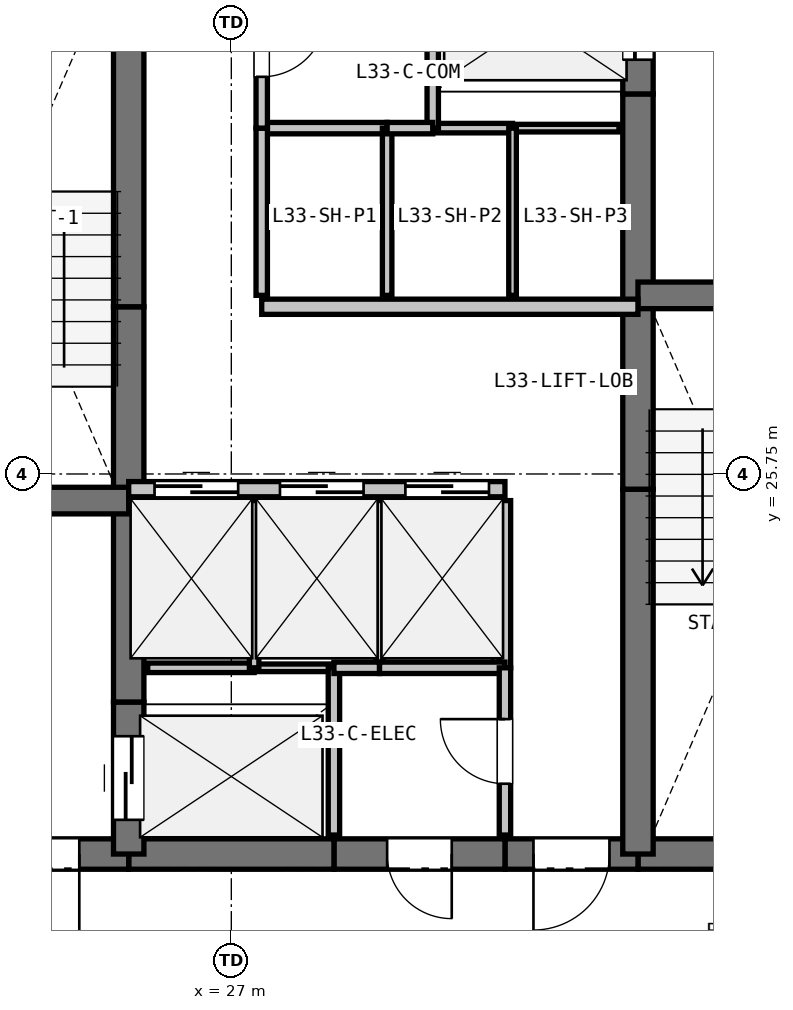
"""IFC4 building model, lengths in metres.
Left out: names, types, materials, properties, quantities, classifications, styles, units other than length and angle.
Written with IfcOpenShell. Run it as: python <this file> out.ifc"""

import sys

from ifc_helpers import new_model, si_unit, direction, frame, frame_2d, origin, place, context, subcontext, project, spatial, rectangle, extrude, element, fill, save


model = new_model("IFC4")
c1 = context("Model", 3, precision=1e-05, world=origin(), true_north=direction((0.0, 1.0)))
c2 = subcontext(c1, "Body", "Model", "MODEL_VIEW")
j1 = project(units=[si_unit("LENGTHUNIT", "METRE"), si_unit("PLANEANGLEUNIT", "RADIAN")], contexts=[c1])
p1 = place(None, origin())
s1 = spatial("IfcSite", under=j1, at=p1, CompositionType="ELEMENT")
p2 = place(p1, origin())
s2 = spatial("IfcBuilding", under=s1, at=p2, CompositionType="ELEMENT")
p3 = place(p2, frame((0.0, 0.0, 121.2)))
s3 = spatial("IfcBuildingStorey", under=s2, at=p3, CompositionType="ELEMENT", Elevation=121.2)
p4 = place(p3, frame((35.8, 20.75, 0.0), z_axis=(0.0, 0.0, 1.0), x_axis=(-1.0, 0.0, 0.0)))
e1 = element("IfcWall", 1, at=p4, inside=s3, PredefinedType="SHEAR", context=c2, shape_type="SweptSolid", body=[
    extrude(rectangle(XDim=3.45, YDim=0.4, at=frame_2d((1.725, 0.0))), origin(), (0.0, 0.0, 1.0), 3.06),
])
p5 = place(p3, frame((32.35, 20.75, 0.0), z_axis=(0.0, 0.0, 1.0), x_axis=(-1.0, 0.0, 0.0)))
e2 = element("IfcWall", 2, at=p5, inside=s3, PredefinedType="SHEAR", context=c2, shape_type="SweptSolid", body=[
    extrude(rectangle(XDim=1.75, YDim=0.4, at=frame_2d((0.875, 0.0))), origin(), (0.0, 0.0, 1.0), 3.06),
])
p6 = place(p5, frame((0.375, 0.0, 0.0)))
e3 = element("IfcOpeningElement", 3, at=p6, cuts=e2, PredefinedType="OPENING", context=c2, shape_type="SweptSolid", body=[
    extrude(rectangle(XDim=1.0, YDim=2.15, at=frame_2d((0.5, 1.075))), frame((0.0, 0.21, 0.0), z_axis=(0.0, -1.0, 0.0), x_axis=(1.0, 0.0, 0.0)), (0.0, 0.0, 1.0), 0.42),
])
p7 = place(p3, frame((30.6, 20.75, 0.0), z_axis=(0.0, 0.0, 1.0), x_axis=(-1.0, 0.0, 0.0)))
e4 = element("IfcWall", 4, at=p7, inside=s3, PredefinedType="SHEAR", context=c2, shape_type="SweptSolid", body=[
    extrude(rectangle(XDim=2.25, YDim=0.4, at=frame_2d((1.125, 0.0))), origin(), (0.0, 0.0, 1.0), 3.06),
])
p8 = place(p7, frame((0.7, 0.0, 0.0)))
e5 = element("IfcOpeningElement", 5, at=p8, cuts=e4, PredefinedType="OPENING", context=c2, shape_type="SweptSolid", body=[
    extrude(rectangle(XDim=0.85, YDim=2.1, at=frame_2d((0.425, 1.05))), frame((0.0, 0.21, 0.0), z_axis=(0.0, -1.0, 0.0), x_axis=(1.0, 0.0, 0.0)), (0.0, 0.0, 1.0), 0.42),
])
p9 = place(p3, frame((28.35, 20.75, 0.0), z_axis=(0.0, 0.0, 1.0), x_axis=(-1.0, 0.0, 0.0)))
e6 = element("IfcWall", 6, at=p9, inside=s3, PredefinedType="SHEAR", context=c2, shape_type="SweptSolid", body=[
    extrude(rectangle(XDim=2.7, YDim=0.4, at=frame_2d((1.35, 0.0))), origin(), (0.0, 0.0, 1.0), 3.06),
])
p10 = place(p3, frame((25.65, 20.75, 0.0), z_axis=(0.0, 0.0, 1.0), x_axis=(-1.0, 0.0, 0.0)))
e7 = element("IfcWall", 7, at=p10, inside=s3, PredefinedType="SHEAR", context=c2, shape_type="SweptSolid", body=[
    extrude(rectangle(XDim=3.45, YDim=0.4, at=frame_2d((1.725, 0.0))), origin(), (0.0, 0.0, 1.0), 3.06),
])
p11 = place(p10, frame((0.65, 0.0, 0.0)))
e8 = element("IfcOpeningElement", 8, at=p11, cuts=e7, PredefinedType="OPENING", context=c2, shape_type="SweptSolid", body=[
    extrude(rectangle(XDim=1.15, YDim=2.15, at=frame_2d((0.575, 1.075))), frame((0.0, 0.21, 0.0), z_axis=(0.0, -1.0, 0.0), x_axis=(1.0, 0.0, 0.0)), (0.0, 0.0, 1.0), 0.42),
])
p12 = place(p3, frame((25.65, 20.75, 0.0), z_axis=(0.0, 0.0, 1.0), x_axis=(0.0, 1.0, 0.0)))
e9 = element("IfcWall", 9, at=p12, inside=s3, PredefinedType="SHEAR", context=c2, shape_type="SweptSolid", body=[
    extrude(rectangle(XDim=2.0, YDim=0.4, at=frame_2d((1.0, 0.0))), origin(), (0.0, 0.0, 1.0), 3.06),
])
p13 = place(p12, frame((0.45, 0.0, 0.0)))
e10 = element("IfcOpeningElement", 10, at=p13, cuts=e9, PredefinedType="OPENING", context=c2, shape_type="SweptSolid", body=[
    extrude(rectangle(XDim=1.1, YDim=2.15, at=frame_2d((0.55, 1.075))), frame((0.0, 0.21, 0.0), z_axis=(0.0, -1.0, 0.0), x_axis=(1.0, 0.0, 0.0)), (0.0, 0.0, 1.0), 0.42),
])
p14 = place(p3, frame((25.65, 22.75, 0.0), z_axis=(0.0, 0.0, 1.0), x_axis=(0.0, 1.0, 0.0)))
e11 = element("IfcWall", 11, at=p14, inside=s3, PredefinedType="SHEAR", context=c2, shape_type="SweptSolid", body=[
    extrude(rectangle(XDim=2.8, YDim=0.4, at=frame_2d((1.4, 0.0))), origin(), (0.0, 0.0, 1.0), 3.06),
])
p15 = place(p3, frame((25.65, 25.55, 0.0), z_axis=(0.0, 0.0, 1.0), x_axis=(0.0, 1.0, 0.0)))
e12 = element("IfcWall", 12, at=p15, inside=s3, PredefinedType="SHEAR", context=c2, shape_type="SweptSolid", body=[
    extrude(rectangle(XDim=2.4, YDim=0.4, at=frame_2d((1.2, 0.0))), origin(), (0.0, 0.0, 1.0), 3.06),
])
for number, where, z_axis, x_axis in (
    (13, (25.65, 27.95, 0.0), (0.0, 0.0, 1.0), (0.0, 1.0, 0.0)),
    (14, (32.35, 20.75, 0.0), (0.0, 0.0, 1.0), (0.0, 1.0, 0.0)),
):
    element("IfcWall", number, at=place(p3, frame(where, z_axis=z_axis, x_axis=x_axis)), inside=s3, PredefinedType="SHEAR", context=c2, shape_type="SweptSolid", body=[
        extrude(rectangle(XDim=4.8, YDim=0.4, at=frame_2d((2.4, 0.0))), origin(), (0.0, 0.0, 1.0), 3.06),
    ])
p16 = place(p3, frame((32.35, 25.55, 0.0), z_axis=(0.0, 0.0, 1.0), x_axis=(0.0, 1.0, 0.0)))
e15 = element("IfcWall", 15, at=p16, inside=s3, PredefinedType="SHEAR", context=c2, shape_type="SweptSolid", body=[
    extrude(rectangle(XDim=2.4, YDim=0.4, at=frame_2d((1.2, 0.0))), origin(), (0.0, 0.0, 1.0), 3.06),
])
p17 = place(p3, frame((32.35, 27.95, 0.0), z_axis=(0.0, 0.0, 1.0), x_axis=(0.0, 1.0, 0.0)))
e16 = element("IfcWall", 16, at=p17, inside=s3, PredefinedType="SHEAR", context=c2, shape_type="SweptSolid", body=[
    extrude(rectangle(XDim=2.8, YDim=0.4, at=frame_2d((1.4, 0.0))), origin(), (0.0, 0.0, 1.0), 3.06),
])
p18 = place(p3, frame((32.35, 30.75, 0.0), z_axis=(0.0, 0.0, 1.0), x_axis=(0.0, 1.0, 0.0)))
e17 = element("IfcWall", 17, at=p18, inside=s3, PredefinedType="SHEAR", context=c2, shape_type="SweptSolid", body=[
    extrude(rectangle(XDim=2.0, YDim=0.4, at=frame_2d((1.0, 0.0))), origin(), (0.0, 0.0, 1.0), 3.06),
])
p19 = place(p18, frame((0.45, 0.0, 0.0)))
e18 = element("IfcOpeningElement", 18, at=p19, cuts=e17, PredefinedType="OPENING", context=c2, shape_type="SweptSolid", body=[
    extrude(rectangle(XDim=1.1, YDim=2.15, at=frame_2d((0.55, 1.075))), frame((0.0, 0.21, 0.0), z_axis=(0.0, -1.0, 0.0), x_axis=(1.0, 0.0, 0.0)), (0.0, 0.0, 1.0), 0.42),
])
p20 = place(p3, frame((22.2, 25.4, 0.0), z_axis=(0.0, 0.0, 1.0), x_axis=(1.0, 0.0, 0.0)))
e19 = element("IfcWall", 19, at=p20, inside=s3, PredefinedType="SHEAR", context=c2, shape_type="SweptSolid", body=[
    extrude(rectangle(XDim=3.45, YDim=0.35, at=frame_2d((1.725, 0.0))), origin(), (0.0, 0.0, 1.0), 3.06),
])
p21 = place(p20, frame((1.15, 0.0, 0.0)))
e20 = element("IfcOpeningElement", 20, at=p21, cuts=e19, PredefinedType="OPENING", context=c2, shape_type="SweptSolid", body=[
    extrude(rectangle(XDim=1.15, YDim=2.15, at=frame_2d((0.575, 1.075))), frame((0.0, 0.185, 0.0), z_axis=(0.0, -1.0, 0.0), x_axis=(1.0, 0.0, 0.0)), (0.0, 0.0, 1.0), 0.37),
])
p22 = place(p3, frame((32.35, 28.1, 0.0), z_axis=(0.0, 0.0, 1.0), x_axis=(1.0, 0.0, 0.0)))
e21 = element("IfcWall", 21, at=p22, inside=s3, PredefinedType="SHEAR", context=c2, shape_type="SweptSolid", body=[
    extrude(rectangle(XDim=3.45, YDim=0.35, at=frame_2d((1.725, 0.0))), origin(), (0.0, 0.0, 1.0), 3.06),
])
p23 = place(p22, frame((1.15, 0.0, 0.0)))
e22 = element("IfcOpeningElement", 22, at=p23, cuts=e21, PredefinedType="OPENING", context=c2, shape_type="SweptSolid", body=[
    extrude(rectangle(XDim=1.15, YDim=2.15, at=frame_2d((0.575, 1.075))), frame((0.0, 0.185, 0.0), z_axis=(0.0, -1.0, 0.0), x_axis=(1.0, 0.0, 0.0)), (0.0, 0.0, 1.0), 0.37),
])
p24 = place(p3, frame((25.65, 25.55, 0.0), z_axis=(0.0, 0.0, 1.0), x_axis=(1.0, 0.0, 0.0)))
e23 = element("IfcWall", 23, at=p24, inside=s3, PredefinedType="PARTITIONING", context=c2, shape_type="SweptSolid", body=[
    extrude(rectangle(XDim=4.95, YDim=0.2, at=frame_2d((2.475, 0.0))), origin(), (0.0, 0.0, 1.0), 3.06),
])
p25 = place(p24, frame((0.34, 0.0, 0.0)))
e24 = element("IfcOpeningElement", 24, at=p25, cuts=e23, PredefinedType="OPENING", context=c2, shape_type="SweptSolid", body=[
    extrude(rectangle(XDim=1.1, YDim=2.15, at=frame_2d((0.55, 1.075))), frame((0.0, 0.11, 0.0), z_axis=(0.0, -1.0, 0.0), x_axis=(1.0, 0.0, 0.0)), (0.0, 0.0, 1.0), 0.22),
])
p26 = place(p24, frame((1.99, 0.0, 0.0)))
e25 = element("IfcOpeningElement", 25, at=p26, cuts=e23, PredefinedType="OPENING", context=c2, shape_type="SweptSolid", body=[
    extrude(rectangle(XDim=1.1, YDim=2.15, at=frame_2d((0.55, 1.075))), frame((0.0, 0.11, 0.0), z_axis=(0.0, -1.0, 0.0), x_axis=(1.0, 0.0, 0.0)), (0.0, 0.0, 1.0), 0.22),
])
p27 = place(p24, frame((3.64, 0.0, 0.0)))
e26 = element("IfcOpeningElement", 26, at=p27, cuts=e23, PredefinedType="OPENING", context=c2, shape_type="SweptSolid", body=[
    extrude(rectangle(XDim=1.1, YDim=2.15, at=frame_2d((0.55, 1.075))), frame((0.0, 0.11, 0.0), z_axis=(0.0, -1.0, 0.0), x_axis=(1.0, 0.0, 0.0)), (0.0, 0.0, 1.0), 0.22),
])
p28 = place(p3, frame((27.4, 27.95, 0.0), z_axis=(0.0, 0.0, 1.0), x_axis=(1.0, 0.0, 0.0)))
e27 = element("IfcWall", 27, at=p28, inside=s3, PredefinedType="PARTITIONING", context=c2, shape_type="SweptSolid", body=[
    extrude(rectangle(XDim=4.95, YDim=0.2, at=frame_2d((2.475, 0.0))), origin(), (0.0, 0.0, 1.0), 3.06),
])
p29 = place(p3, frame((25.9, 23.2, 0.0), z_axis=(0.0, 0.0, 1.0), x_axis=(1.0, 0.0, 0.0)))
e28 = element("IfcWall", 28, at=p29, inside=s3, PredefinedType="PARTITIONING", context=c2, shape_type="SweptSolid", body=[
    extrude(rectangle(XDim=1.4, YDim=0.125, at=frame_2d((0.7, 0.0))), origin(), (0.0, 0.0, 1.0), 3.06),
])
p30 = place(p3, frame((27.3, 23.2, 0.0), z_axis=(0.0, 0.0, 1.0), x_axis=(1.0, 0.0, 0.0)))
e29 = element("IfcWall", 29, at=p30, inside=s3, PredefinedType="PARTITIONING", context=c2, shape_type="SweptSolid", body=[
    extrude(rectangle(XDim=1.05, YDim=0.1, at=frame_2d((0.525, 0.0))), origin(), (0.0, 0.0, 1.0), 3.06),
])
p31 = place(p3, frame((28.35, 23.2, 0.0), z_axis=(0.0, 0.0, 1.0), x_axis=(0.0, -1.0, 0.0)))
e30 = element("IfcWall", 30, at=p31, inside=s3, PredefinedType="PARTITIONING", context=c2, shape_type="SweptSolid", body=[
    extrude(rectangle(XDim=2.2, YDim=0.15, at=frame_2d((1.1, 0.0))), origin(), (0.0, 0.0, 1.0), 3.06),
])
p32 = place(p3, frame((32.1, 30.3, 0.0), z_axis=(0.0, 0.0, 1.0), x_axis=(-1.0, 0.0, 0.0)))
e31 = element("IfcWall", 31, at=p32, inside=s3, PredefinedType="PARTITIONING", context=c2, shape_type="SweptSolid", body=[
    extrude(rectangle(XDim=1.4, YDim=0.1, at=frame_2d((0.7, 0.0))), origin(), (0.0, 0.0, 1.0), 3.06),
])
p33 = place(p3, frame((30.7, 30.3, 0.0), z_axis=(0.0, 0.0, 1.0), x_axis=(-1.0, 0.0, 0.0)))
e32 = element("IfcWall", 32, at=p33, inside=s3, PredefinedType="PARTITIONING", context=c2, shape_type="SweptSolid", body=[
    extrude(rectangle(XDim=1.05, YDim=0.125, at=frame_2d((0.525, 0.0))), origin(), (0.0, 0.0, 1.0), 3.06),
])
p34 = place(p3, frame((29.65, 30.3, 0.0), z_axis=(0.0, 0.0, 1.0), x_axis=(0.0, 1.0, 0.0)))
e33 = element("IfcWall", 33, at=p34, inside=s3, PredefinedType="PARTITIONING", context=c2, shape_type="SweptSolid", body=[
    extrude(rectangle(XDim=2.2, YDim=0.15, at=frame_2d((1.1, 0.0))), origin(), (0.0, 0.0, 1.0), 3.06),
])
p35 = place(p3, frame((27.3, 25.4, 0.0), z_axis=(0.0, 0.0, 1.0), x_axis=(0.0, -1.0, 0.0)))
e34 = element("IfcWall", 34, at=p35, inside=s3, PredefinedType="PARTITIONING", context=c2, shape_type="SweptSolid", body=[
    extrude(rectangle(XDim=2.2, YDim=0.125, at=frame_2d((1.1, 0.0))), origin(), (0.0, 0.0, 1.0), 3.06),
])
p36 = place(p3, frame((28.95, 25.4, 0.0), z_axis=(0.0, 0.0, 1.0), x_axis=(0.0, -1.0, 0.0)))
e35 = element("IfcWall", 35, at=p36, inside=s3, PredefinedType="PARTITIONING", context=c2, shape_type="SweptSolid", body=[
    extrude(rectangle(XDim=2.2, YDim=0.1, at=frame_2d((1.1, 0.0))), origin(), (0.0, 0.0, 1.0), 3.06),
])
p37 = place(p3, frame((28.95, 23.2, 0.0), z_axis=(0.0, 0.0, 1.0), x_axis=(-1.0, 0.0, 0.0)))
e36 = element("IfcWall", 36, at=p37, inside=s3, PredefinedType="PARTITIONING", context=c2, shape_type="SweptSolid", body=[
    extrude(rectangle(XDim=0.6, YDim=0.15, at=frame_2d((0.3, 0.0))), origin(), (0.0, 0.0, 1.0), 3.06),
])
p38 = place(p3, frame((30.6, 25.4, 0.0), z_axis=(0.0, 0.0, 1.0), x_axis=(0.0, -1.0, 0.0)))
e37 = element("IfcWall", 37, at=p38, inside=s3, PredefinedType="PARTITIONING", context=c2, shape_type="SweptSolid", body=[
    extrude(rectangle(XDim=2.2, YDim=0.15, at=frame_2d((1.1, 0.0))), origin(), (0.0, 0.0, 1.0), 3.06),
])
for number, where, z_axis, x_axis in (
    (38, (30.6, 23.2, 0.0), (0.0, 0.0, 1.0), (-1.0, 0.0, 0.0)),
    (39, (27.4, 30.3, 0.0), (0.0, 0.0, 1.0), (1.0, 0.0, 0.0)),
):
    element("IfcWall", number, at=place(p3, frame(where, z_axis=z_axis, x_axis=x_axis)), inside=s3, PredefinedType="PARTITIONING", context=c2, shape_type="SweptSolid", body=[
        extrude(rectangle(XDim=1.65, YDim=0.15, at=frame_2d((0.825, 0.0))), origin(), (0.0, 0.0, 1.0), 3.06),
    ])
p39 = place(p3, frame((29.05, 30.3, 0.0), z_axis=(0.0, 0.0, 1.0), x_axis=(0.0, -1.0, 0.0)))
e40 = element("IfcWall", 40, at=p39, inside=s3, PredefinedType="PARTITIONING", context=c2, shape_type="SweptSolid", body=[
    extrude(rectangle(XDim=2.2, YDim=0.125, at=frame_2d((1.1, 0.0))), origin(), (0.0, 0.0, 1.0), 3.06),
])
p40 = place(p3, frame((27.4, 28.1, 0.0), z_axis=(0.0, 0.0, 1.0), x_axis=(0.0, 1.0, 0.0)))
e41 = element("IfcWall", 41, at=p40, inside=s3, PredefinedType="PARTITIONING", context=c2, shape_type="SweptSolid", body=[
    extrude(rectangle(XDim=2.2, YDim=0.15, at=frame_2d((1.1, 0.0))), origin(), (0.0, 0.0, 1.0), 3.06),
])
p41 = place(p3, frame((29.05, 30.3, 0.0), z_axis=(0.0, 0.0, 1.0), x_axis=(1.0, 0.0, 0.0)))
e42 = element("IfcWall", 42, at=p41, inside=s3, PredefinedType="PARTITIONING", context=c2, shape_type="SweptSolid", body=[
    extrude(rectangle(XDim=0.6, YDim=0.15, at=frame_2d((0.3, 0.0))), origin(), (0.0, 0.0, 1.0), 3.06),
])
p42 = place(p3, frame((30.7, 30.3, 0.0), z_axis=(0.0, 0.0, 1.0), x_axis=(0.0, -1.0, 0.0)))
e43 = element("IfcWall", 43, at=p42, inside=s3, PredefinedType="PARTITIONING", context=c2, shape_type="SweptSolid", body=[
    extrude(rectangle(XDim=2.2, YDim=0.1, at=frame_2d((1.1, 0.0))), origin(), (0.0, 0.0, 1.0), 3.06),
])
p43 = place(p3, frame((30.6, 21.0, 0.0), z_axis=(0.0, 0.0, 1.0), x_axis=(0.0, 1.0, 0.0)))
e44 = element("IfcWall", 44, at=p43, inside=s3, PredefinedType="PARTITIONING", context=c2, shape_type="SweptSolid", body=[
    extrude(rectangle(XDim=2.2, YDim=0.15, at=frame_2d((1.1, 0.0))), origin(), (0.0, 0.0, 1.0), 3.06),
])
p44 = place(p43, frame((0.675, 0.0, 0.0)))
e45 = element("IfcOpeningElement", 45, at=p44, cuts=e44, PredefinedType="OPENING", context=c2, shape_type="SweptSolid", body=[
    extrude(rectangle(XDim=0.85, YDim=2.1, at=frame_2d((0.425, 1.05))), frame((0.0, 0.085, 0.0), z_axis=(0.0, -1.0, 0.0), x_axis=(1.0, 0.0, 0.0)), (0.0, 0.0, 1.0), 0.17),
])
p45 = place(p3, frame((27.4, 32.5, 0.0), z_axis=(0.0, 0.0, 1.0), x_axis=(0.0, -1.0, 0.0)))
e46 = element("IfcWall", 46, at=p45, inside=s3, PredefinedType="PARTITIONING", context=c2, shape_type="SweptSolid", body=[
    extrude(rectangle(XDim=2.2, YDim=0.15, at=frame_2d((1.1, 0.0))), origin(), (0.0, 0.0, 1.0), 3.06),
])
p46 = place(p45, frame((0.675, 0.0, 0.0)))
e47 = element("IfcOpeningElement", 47, at=p46, cuts=e46, PredefinedType="OPENING", context=c2, shape_type="SweptSolid", body=[
    extrude(rectangle(XDim=0.85, YDim=2.1, at=frame_2d((0.425, 1.05))), frame((0.0, 0.085, 0.0), z_axis=(0.0, -1.0, 0.0), x_axis=(1.0, 0.0, 0.0)), (0.0, 0.0, 1.0), 0.17),
])
p47 = place(p25, origin())
e48 = element("IfcDoor", 48, at=p47, inside=s3, OperationType="SLIDING_TO_LEFT", PredefinedType="DOOR", context=c2, shape_type="SweptSolid", body=[
    extrude(rectangle(XDim=1.1, YDim=2.15, at=frame_2d((0.55, 1.075))), frame((0.0, 0.025, 0.0), z_axis=(0.0, -1.0, 0.0), x_axis=(1.0, 0.0, 0.0)), (0.0, 0.0, 1.0), 0.05),
])
fill(e24, e48)
p48 = place(p26, origin())
e49 = element("IfcDoor", 49, at=p48, inside=s3, OperationType="SLIDING_TO_LEFT", PredefinedType="DOOR", context=c2, shape_type="SweptSolid", body=[
    extrude(rectangle(XDim=1.1, YDim=2.15, at=frame_2d((0.55, 1.075))), frame((0.0, 0.025, 0.0), z_axis=(0.0, -1.0, 0.0), x_axis=(1.0, 0.0, 0.0)), (0.0, 0.0, 1.0), 0.05),
])
fill(e25, e49)
p49 = place(p27, origin())
e50 = element("IfcDoor", 50, at=p49, inside=s3, OperationType="SLIDING_TO_LEFT", PredefinedType="DOOR", context=c2, shape_type="SweptSolid", body=[
    extrude(rectangle(XDim=1.1, YDim=2.15, at=frame_2d((0.55, 1.075))), frame((0.0, 0.025, 0.0), z_axis=(0.0, -1.0, 0.0), x_axis=(1.0, 0.0, 0.0)), (0.0, 0.0, 1.0), 0.05),
])
fill(e26, e50)
p50 = place(p6, origin())
e51 = element("IfcDoor", 51, at=p50, inside=s3, OperationType="SINGLE_SWING_RIGHT", PredefinedType="DOOR", context=c2, shape_type="SweptSolid", body=[
    extrude(rectangle(XDim=1.0, YDim=2.15, at=frame_2d((0.5, 1.075))), frame((0.0, 0.025, 0.0), z_axis=(0.0, -1.0, 0.0), x_axis=(1.0, 0.0, 0.0)), (0.0, 0.0, 1.0), 0.05),
])
fill(e3, e51)
p51 = place(p13, origin())
e52 = element("IfcDoor", 52, at=p51, inside=s3, OperationType="SLIDING_TO_LEFT", PredefinedType="DOOR", context=c2, shape_type="SweptSolid", body=[
    extrude(rectangle(XDim=1.1, YDim=2.15, at=frame_2d((0.55, 1.075))), frame((0.0, 0.025, 0.0), z_axis=(0.0, -1.0, 0.0), x_axis=(1.0, 0.0, 0.0)), (0.0, 0.0, 1.0), 0.05),
])
fill(e10, e52)
p52 = place(p19, origin())
e53 = element("IfcDoor", 53, at=p52, inside=s3, OperationType="SLIDING_TO_LEFT", PredefinedType="DOOR", context=c2, shape_type="SweptSolid", body=[
    extrude(rectangle(XDim=1.1, YDim=2.15, at=frame_2d((0.55, 1.075))), frame((0.0, 0.025, 0.0), z_axis=(0.0, -1.0, 0.0), x_axis=(1.0, 0.0, 0.0)), (0.0, 0.0, 1.0), 0.05),
])
fill(e18, e53)
p53 = place(p11, origin())
e54 = element("IfcDoor", 54, at=p53, inside=s3, OperationType="SINGLE_SWING_LEFT", PredefinedType="DOOR", context=c2, shape_type="SweptSolid", body=[
    extrude(rectangle(XDim=1.15, YDim=2.15, at=frame_2d((0.575, 1.075))), frame((0.0, 0.025, 0.0), z_axis=(0.0, -1.0, 0.0), x_axis=(1.0, 0.0, 0.0)), (0.0, 0.0, 1.0), 0.05),
])
fill(e8, e54)
p54 = place(p44, origin())
e55 = element("IfcDoor", 55, at=p54, inside=s3, OperationType="SINGLE_SWING_RIGHT", PredefinedType="DOOR", context=c2, shape_type="SweptSolid", body=[
    extrude(rectangle(XDim=0.85, YDim=2.1, at=frame_2d((0.425, 1.05))), frame((0.0, 0.025, 0.0), z_axis=(0.0, -1.0, 0.0), x_axis=(1.0, 0.0, 0.0)), (0.0, 0.0, 1.0), 0.05),
])
fill(e45, e55)
p55 = place(p46, origin())
e56 = element("IfcDoor", 56, at=p55, inside=s3, OperationType="SINGLE_SWING_LEFT", PredefinedType="DOOR", context=c2, shape_type="SweptSolid", body=[
    extrude(rectangle(XDim=0.85, YDim=2.1, at=frame_2d((0.425, 1.05))), frame((0.0, 0.025, 0.0), z_axis=(0.0, -1.0, 0.0), x_axis=(1.0, 0.0, 0.0)), (0.0, 0.0, 1.0), 0.05),
])
fill(e47, e56)
p56 = place(p8, origin())
e57 = element("IfcDoor", 57, at=p56, inside=s3, OperationType="SINGLE_SWING_LEFT", PredefinedType="DOOR", context=c2, shape_type="SweptSolid", body=[
    extrude(rectangle(XDim=0.85, YDim=2.1, at=frame_2d((0.425, 1.05))), frame((0.0, 0.025, 0.0), z_axis=(0.0, -1.0, 0.0), x_axis=(1.0, 0.0, 0.0)), (0.0, 0.0, 1.0), 0.05),
])
fill(e5, e57)
save(model, sys.argv[1])
